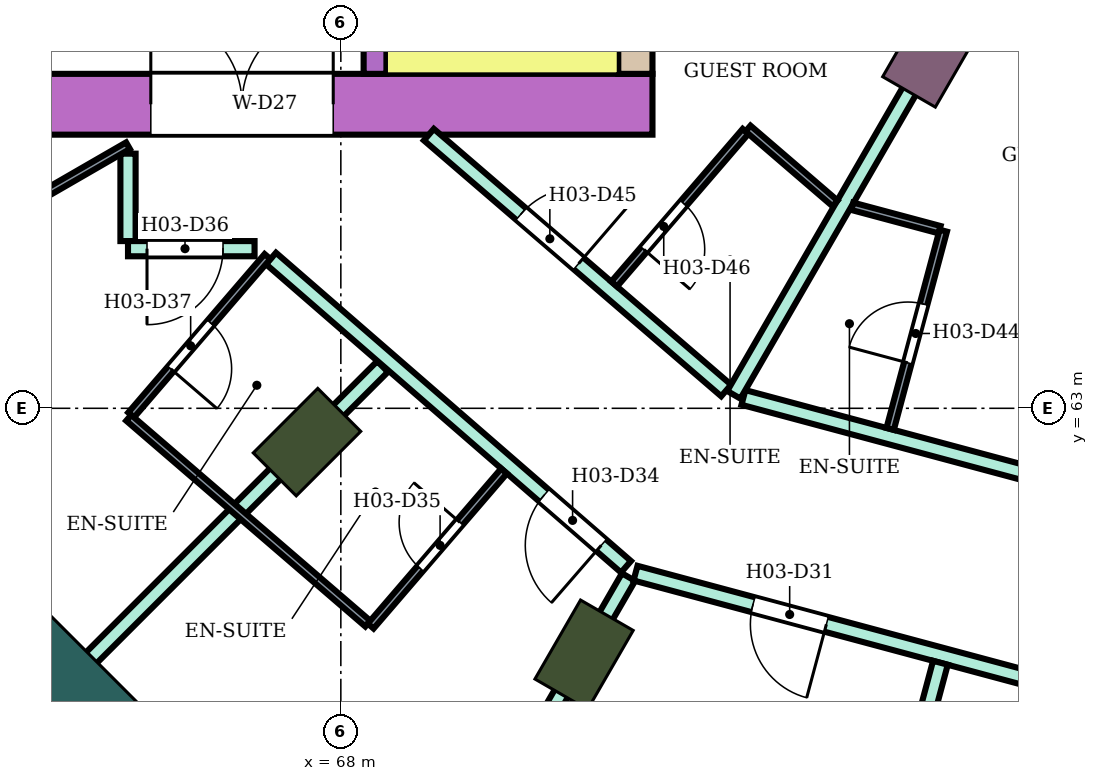
"""IFC4 building model, lengths in metres.
Left out: names, types, materials, properties, quantities, classifications, styles, units other than length and angle.
Written with IfcOpenShell. Run it as: python <this file> out.ifc"""

import sys

from ifc_helpers import new_model, si_unit, direction, frame, frame_2d, origin, origin_2d, place, context, subcontext, project, spatial, rectangle, extrude, element, fill, save


model = new_model("IFC4")
c1 = context("Model", 3, precision=1e-05, world=origin(), true_north=direction((0.0, 1.0)))
c2 = subcontext(c1, "Body", "Model", "MODEL_VIEW")
j1 = project(units=[si_unit("LENGTHUNIT", "METRE"), si_unit("PLANEANGLEUNIT", "RADIAN")], contexts=[c1])
p1 = place(None, origin())
s1 = spatial("IfcSite", under=j1, at=p1, CompositionType="ELEMENT")
p2 = place(p1, origin())
s2 = spatial("IfcBuilding", under=s1, at=p2, CompositionType="ELEMENT")
p3 = place(p2, frame((0.0, 0.0, 55.4)))
s3 = spatial("IfcBuildingStorey", under=s2, at=p3, CompositionType="ELEMENT", Elevation=55.4)
for number, where, z_axis, x_axis in (
    (1, (67.555, 62.555, 0.0), (0.0, 0.0, 1.0), (-0.707, -0.707, 0.0)),
    (2, (71.2, 59.758, 0.0), (0.0, 0.0, 1.0), (-0.5, -0.866, 0.0)),
):
    element("IfcColumn", number, at=place(p3, frame(where, z_axis=z_axis, x_axis=x_axis)), inside=s3, PredefinedType="COLUMN", context=c2, shape_type="SweptSolid", body=[
        extrude(rectangle(XDim=1.2, YDim=0.8, at=origin_2d()), origin(), (0.0, 0.0, 1.0), 3.8),
    ])
p4 = place(p3, frame((75.7, 67.552, 0.0), z_axis=(0.0, 0.0, 1.0), x_axis=(-0.5, -0.866025403784, 0.0)))
e3 = element("IfcColumn", 3, at=p4, inside=s3, PredefinedType="COLUMN", context=c2, shape_type="SweptSolid", body=[
    extrude(rectangle(XDim=0.9, YDim=0.8, at=origin_2d()), origin(), (0.0, 0.0, 1.0), 3.8),
])
p5 = place(p3, frame((64.09, 59.09, 0.0), z_axis=(0.0, 0.0, 1.0), x_axis=(-0.707106781187, -0.707106781187, 0.0)))
e4 = element("IfcColumn", 4, at=p5, inside=s3, PredefinedType="COLUMN", context=c2, shape_type="SweptSolid", body=[
    extrude(rectangle(XDim=1.8, YDim=2.4, at=origin_2d()), origin(), (0.0, 0.0, 1.0), 3.8),
])
p6 = place(p3, frame((72.1, 67.0, 0.0), z_axis=(0.0, 0.0, 1.0), x_axis=(-1.0, 0.0, 0.0)))
e5 = element("IfcWall", 5, at=p6, inside=s3, PredefinedType="SHEAR", context=c2, shape_type="SweptSolid", body=[
    extrude(rectangle(XDim=14.7, YDim=0.8, at=frame_2d((7.35, 0.0))), origin(), (0.0, 0.0, 1.0), 3.48),
])
p7 = place(p6, frame((4.2, 0.0, 0.0)))
e6 = element("IfcOpeningElement", 6, at=p7, cuts=e5, PredefinedType="OPENING", context=c2, shape_type="SweptSolid", body=[
    extrude(rectangle(XDim=2.4, YDim=2.4, at=frame_2d((1.2, 1.2))), frame((0.0, 0.41, 0.0), z_axis=(0.0, -1.0, 0.0), x_axis=(1.0, 0.0, 0.0)), (0.0, 0.0, 1.0), 0.82),
])
p8 = place(p3, frame((71.875, 75.0, 0.0), z_axis=(0.0, 0.0, 1.0), x_axis=(0.0, -1.0, 0.0)))
e7 = element("IfcWall", 7, at=p8, inside=s3, PredefinedType="SHEAR", context=c2, shape_type="SweptSolid", body=[
    extrude(rectangle(XDim=7.6, YDim=0.45, at=frame_2d((3.8, 0.0))), origin(), (0.0, 0.0, 1.0), 3.48),
])
p9 = place(p3, frame((68.45, 75.0, 0.0), z_axis=(0.0, 0.0, 1.0), x_axis=(0.0, -1.0, 0.0)))
e8 = element("IfcWall", 8, at=p9, inside=s3, PredefinedType="SHEAR", context=c2, shape_type="SweptSolid", body=[
    extrude(rectangle(XDim=7.6, YDim=0.3, at=frame_2d((3.8, 0.0))), origin(), (0.0, 0.0, 1.0), 3.48),
])
p10 = place(p9, frame((1.85, 0.0, 0.0)))
e9 = element("IfcOpeningElement", 9, at=p10, cuts=e8, PredefinedType="OPENING", context=c2, shape_type="SweptSolid", body=[
    extrude(rectangle(XDim=0.9, YDim=2.1, at=frame_2d((0.45, 1.05))), frame((0.0, 0.16, 0.0), z_axis=(0.0, -1.0, 0.0), x_axis=(1.0, 0.0, 0.0)), (0.0, 0.0, 1.0), 0.32),
])
p11 = place(p3, frame((76.198, 68.415, 0.0), z_axis=(0.0, 0.0, 1.0), x_axis=(0.965933654434, -0.258789828301, 0.0)))
e10 = element("IfcWall", 10, at=p11, inside=s3, PredefinedType="NOTDEFINED", context=c2, shape_type="SweptSolid", body=[
    extrude(rectangle(XDim=3.936, YDim=0.2, at=frame_2d((1.968, 0.0))), origin(), (0.0, 0.0, 1.0), 3.8),
])
p12 = place(p11, frame((0.468, 0.0, 0.9)))
e11 = element("IfcOpeningElement", 11, at=p12, cuts=e10, PredefinedType="OPENING", context=c2, shape_type="SweptSolid", body=[
    extrude(rectangle(XDim=3.0, YDim=2.3, at=frame_2d((1.5, 1.15))), frame((0.0, 0.11, 0.0), z_axis=(0.0, -1.0, 0.0), x_axis=(1.0, 0.0, 0.0)), (0.0, 0.0, 1.0), 0.22),
])
p13 = place(p3, frame((63.596, 58.596, 0.0), z_axis=(0.0, 0.0, 1.0), x_axis=(0.707106781187, 0.707106781187, 0.0)))
e12 = element("IfcWall", 12, at=p13, inside=s3, PredefinedType="PARTITIONING", context=c2, shape_type="SweptSolid", body=[
    extrude(rectangle(XDim=7.005, YDim=0.2, at=frame_2d((3.503, 0.0))), origin(), (0.0, 0.0, 1.0), 3.35),
])
p14 = place(p3, frame((65.2, 65.2, 0.0), z_axis=(0.0, 0.0, 1.0), x_axis=(0.0, 1.0, 0.0)))
e13 = element("IfcWall", 13, at=p14, inside=s3, PredefinedType="PARTITIONING", context=c2, shape_type="SweptSolid", body=[
    extrude(rectangle(XDim=1.15, YDim=0.2, at=frame_2d((0.575, 0.0))), origin(), (0.0, 0.0, 1.0), 3.35),
])
p15 = place(p3, frame((65.2, 65.1, 0.0), z_axis=(0.0, 0.0, 1.0), x_axis=(1.0, 0.0, 0.0)))
e14 = element("IfcWall", 14, at=p15, inside=s3, PredefinedType="PARTITIONING", context=c2, shape_type="SweptSolid", body=[
    extrude(rectangle(XDim=1.665, YDim=0.2, at=frame_2d((0.833, 0.0))), origin(), (0.0, 0.0, 1.0), 3.35),
])
p16 = place(p15, frame((0.25, 0.0, 0.0)))
e15 = element("IfcOpeningElement", 15, at=p16, cuts=e14, PredefinedType="OPENING", context=c2, shape_type="SweptSolid", body=[
    extrude(rectangle(XDim=1.0, YDim=2.1, at=frame_2d((0.5, 1.05))), frame((0.0, 0.11, 0.0), z_axis=(0.0, -1.0, 0.0), x_axis=(1.0, 0.0, 0.0)), (0.0, 0.0, 1.0), 0.22),
])
p17 = place(p3, frame((67.081, 64.971, 0.0), z_axis=(0.0, 0.0, 1.0), x_axis=(0.755031061605, -0.65568902386, 0.0)))
e16 = element("IfcWall", 16, at=p17, inside=s3, PredefinedType="PARTITIONING", context=c2, shape_type="SweptSolid", body=[
    extrude(rectangle(XDim=6.186, YDim=0.2, at=frame_2d((3.093, 0.0))), origin(), (0.0, 0.0, 1.0), 3.35),
])
p18 = place(p17, frame((4.755, 0.0, 0.0)))
e17 = element("IfcOpeningElement", 17, at=p18, cuts=e16, PredefinedType="OPENING", context=c2, shape_type="SweptSolid", body=[
    extrude(rectangle(XDim=1.0, YDim=2.1, at=frame_2d((0.5, 1.05))), frame((0.0, 0.11, 0.0), z_axis=(0.0, -1.0, 0.0), x_axis=(1.0, 0.0, 0.0)), (0.0, 0.0, 1.0), 0.22),
])
p19 = place(p3, frame((67.095, 52.662, 0.0), z_axis=(0.0, 0.0, 1.0), x_axis=(0.500247659952, 0.865882370021, 0.0)))
e18 = element("IfcWall", 18, at=p19, inside=s3, PredefinedType="PARTITIONING", context=c2, shape_type="SweptSolid", body=[
    extrude(rectangle(XDim=9.375, YDim=0.2, at=frame_2d((4.688, 0.0))), origin(), (0.0, 0.0, 1.0), 3.35),
])
p20 = place(p3, frame((69.158, 66.6, 0.0), z_axis=(0.0, 0.0, 1.0), x_axis=(0.757976058094, -0.652282373943, 0.0)))
e19 = element("IfcWall", 19, at=p20, inside=s3, PredefinedType="PARTITIONING", context=c2, shape_type="SweptSolid", body=[
    extrude(rectangle(XDim=5.16, YDim=0.2, at=frame_2d((2.58, 0.0))), origin(), (0.0, 0.0, 1.0), 3.35),
])
p21 = place(p20, frame((1.6, 0.0, 0.0)))
e20 = element("IfcOpeningElement", 20, at=p21, cuts=e19, PredefinedType="OPENING", context=c2, shape_type="SweptSolid", body=[
    extrude(rectangle(XDim=1.0, YDim=2.1, at=frame_2d((0.5, 1.05))), frame((0.0, 0.11, 0.0), z_axis=(0.0, -1.0, 0.0), x_axis=(1.0, 0.0, 0.0)), (0.0, 0.0, 1.0), 0.22),
])
p22 = place(p3, frame((71.877, 60.831, 0.0), z_axis=(0.0, 0.0, 1.0), x_axis=(0.965852509869, -0.259092510851, 0.0)))
e21 = element("IfcWall", 21, at=p22, inside=s3, PredefinedType="PARTITIONING", context=c2, shape_type="SweptSolid", body=[
    extrude(rectangle(XDim=8.32, YDim=0.2, at=frame_2d((4.16, 0.0))), origin(), (0.0, 0.0, 1.0), 3.35),
])
p23 = place(p22, frame((6.86, 0.0, 0.0)))
e22 = element("IfcOpeningElement", 22, at=p23, cuts=e21, PredefinedType="OPENING", context=c2, shape_type="SweptSolid", body=[
    extrude(rectangle(XDim=1.0, YDim=2.1, at=frame_2d((0.5, 1.05))), frame((0.0, 0.11, 0.0), z_axis=(0.0, -1.0, 0.0), x_axis=(1.0, 0.0, 0.0)), (0.0, 0.0, 1.0), 0.22),
])
p24 = place(p22, frame((1.6, 0.0, 0.0)))
e23 = element("IfcOpeningElement", 23, at=p24, cuts=e21, PredefinedType="OPENING", context=c2, shape_type="SweptSolid", body=[
    extrude(rectangle(XDim=1.0, YDim=2.1, at=frame_2d((0.5, 1.05))), frame((0.0, 0.11, 0.0), z_axis=(0.0, -1.0, 0.0), x_axis=(1.0, 0.0, 0.0)), (0.0, 0.0, 1.0), 0.22),
])
p25 = place(p3, frame((73.297, 63.143, 0.0), z_axis=(0.0, 0.0, 1.0), x_axis=(0.965859030528, -0.25906820173, 0.0)))
e24 = element("IfcWall", 24, at=p25, inside=s3, PredefinedType="PARTITIONING", context=c2, shape_type="SweptSolid", body=[
    extrude(rectangle(XDim=6.81, YDim=0.2, at=frame_2d((3.405, 0.0))), origin(), (0.0, 0.0, 1.0), 3.35),
])
p26 = place(p25, frame((5.39, 0.0, 0.0)))
e25 = element("IfcOpeningElement", 25, at=p26, cuts=e24, PredefinedType="OPENING", context=c2, shape_type="SweptSolid", body=[
    extrude(rectangle(XDim=1.0, YDim=2.1, at=frame_2d((0.5, 1.05))), frame((0.0, 0.11, 0.0), z_axis=(0.0, -1.0, 0.0), x_axis=(1.0, 0.0, 0.0)), (0.0, 0.0, 1.0), 0.22),
])
p27 = place(p3, frame((73.17, 63.177, 0.0), z_axis=(0.0, 0.0, 1.0), x_axis=(0.500239348149, 0.865887171959, 0.0)))
e26 = element("IfcWall", 26, at=p27, inside=s3, PredefinedType="PARTITIONING", context=c2, shape_type="SweptSolid", body=[
    extrude(rectangle(XDim=5.955, YDim=0.2, at=frame_2d((2.978, 0.0))), origin(), (0.0, 0.0, 1.0), 3.35),
])
p28 = place(p3, frame((73.322, 50.081, 0.0), z_axis=(0.0, 0.0, 1.0), x_axis=(0.25896431718, 0.965886889044, 0.0)))
e27 = element("IfcWall", 27, at=p28, inside=s3, PredefinedType="PARTITIONING", context=c2, shape_type="SweptSolid", body=[
    extrude(rectangle(XDim=9.909, YDim=0.2, at=frame_2d((4.955, 0.0))), origin(), (0.0, 0.0, 1.0), 3.35),
])
p29 = place(p3, frame((57.659, 62.101, 0.0), z_axis=(0.0, 0.0, 1.0), x_axis=(0.86602264145, 0.500004784474, 0.0)))
e28 = element("IfcWall", 28, at=p29, inside=s3, PredefinedType="PARTITIONING", context=c2, shape_type="SweptSolid", body=[
    extrude(rectangle(XDim=8.708, YDim=0.1, at=frame_2d((4.354, 0.0))), origin(), (0.0, 0.0, 1.0), 3.35),
])
p30 = place(p29, frame((3.929, 0.0, 0.0)))
e29 = element("IfcOpeningElement", 29, at=p30, cuts=e28, PredefinedType="OPENING", context=c2, shape_type="SweptSolid", body=[
    extrude(rectangle(XDim=0.9, YDim=2.1, at=frame_2d((0.45, 1.05))), frame((0.0, 0.06, 0.0), z_axis=(0.0, -1.0, 0.0), x_axis=(1.0, 0.0, 0.0)), (0.0, 0.0, 1.0), 0.12),
])
p31 = place(p3, frame((65.242, 62.912, 0.0), z_axis=(0.0, 0.0, 1.0), x_axis=(0.652069888227, 0.758158862553, 0.0)))
e30 = element("IfcWall", 30, at=p31, inside=s3, PredefinedType="PARTITIONING", context=c2, shape_type="SweptSolid", body=[
    extrude(rectangle(XDim=2.75, YDim=0.1, at=frame_2d((1.375, 0.0))), origin(), (0.0, 0.0, 1.0), 3.35),
])
p32 = place(p31, frame((0.8, 0.0, 0.0)))
e31 = element("IfcOpeningElement", 31, at=p32, cuts=e30, PredefinedType="OPENING", context=c2, shape_type="SweptSolid", body=[
    extrude(rectangle(XDim=0.8, YDim=2.1, at=frame_2d((0.4, 1.05))), frame((0.0, 0.06, 0.0), z_axis=(0.0, -1.0, 0.0), x_axis=(1.0, 0.0, 0.0)), (0.0, 0.0, 1.0), 0.12),
])
p33 = place(p3, frame((65.209, 62.875, 0.0), z_axis=(0.0, 0.0, 1.0), x_axis=(0.757930378138, -0.652335451969, 0.0)))
e32 = element("IfcWall", 32, at=p33, inside=s3, PredefinedType="PARTITIONING", context=c2, shape_type="SweptSolid", body=[
    extrude(rectangle(XDim=4.15, YDim=0.1, at=frame_2d((2.075, 0.0))), origin(), (0.0, 0.0, 1.0), 3.35),
])
p34 = place(p3, frame((68.393, 60.135, 0.0), z_axis=(0.0, 0.0, 1.0), x_axis=(0.652061182569, 0.758166349944, 0.0)))
e33 = element("IfcWall", 33, at=p34, inside=s3, PredefinedType="PARTITIONING", context=c2, shape_type="SweptSolid", body=[
    extrude(rectangle(XDim=2.69, YDim=0.1, at=frame_2d((1.345, 0.0))), origin(), (0.0, 0.0, 1.0), 3.35),
])
p35 = place(p34, frame((1.0, 0.0, 0.0)))
e34 = element("IfcOpeningElement", 34, at=p35, cuts=e33, PredefinedType="OPENING", context=c2, shape_type="SweptSolid", body=[
    extrude(rectangle(XDim=0.8, YDim=2.1, at=frame_2d((0.4, 1.05))), frame((0.0, 0.06, 0.0), z_axis=(0.0, -1.0, 0.0), x_axis=(1.0, 0.0, 0.0)), (0.0, 0.0, 1.0), 0.12),
])
p36 = place(p3, frame((71.596, 64.635, 0.0), z_axis=(0.0, 0.0, 1.0), x_axis=(0.652285007511, 0.757973791748, 0.0)))
e35 = element("IfcWall", 35, at=p36, inside=s3, PredefinedType="PARTITIONING", context=c2, shape_type="SweptSolid", body=[
    extrude(rectangle(XDim=2.65, YDim=0.1, at=frame_2d((1.325, 0.0))), origin(), (0.0, 0.0, 1.0), 3.35),
])
p37 = place(p36, frame((0.6, 0.0, 0.0)))
e36 = element("IfcOpeningElement", 36, at=p37, cuts=e35, PredefinedType="OPENING", context=c2, shape_type="SweptSolid", body=[
    extrude(rectangle(XDim=0.8, YDim=2.1, at=frame_2d((0.4, 1.05))), frame((0.0, 0.06, 0.0), z_axis=(0.0, -1.0, 0.0), x_axis=(1.0, 0.0, 0.0)), (0.0, 0.0, 1.0), 0.12),
])
p38 = place(p3, frame((73.357, 66.681, 0.0), z_axis=(0.0, 0.0, 1.0), x_axis=(0.758263469747, -0.651948242154, 0.0)))
e37 = element("IfcWall", 37, at=p38, inside=s3, PredefinedType="PARTITIONING", context=c2, shape_type="SweptSolid", body=[
    extrude(rectangle(XDim=1.511, YDim=0.1, at=frame_2d((0.755, 0.0))), origin(), (0.0, 0.0, 1.0), 3.35),
])
p39 = place(p3, frame((74.729, 65.657, 0.0), z_axis=(0.0, 0.0, 1.0), x_axis=(0.965948051503, -0.258736085224, 0.0)))
e38 = element("IfcWall", 38, at=p39, inside=s3, PredefinedType="PARTITIONING", context=c2, shape_type="SweptSolid", body=[
    extrude(rectangle(XDim=1.189, YDim=0.1, at=frame_2d((0.594, 0.0))), origin(), (0.0, 0.0, 1.0), 3.35),
])
p40 = place(p3, frame((75.227, 62.729, 0.0), z_axis=(0.0, 0.0, 1.0), x_axis=(0.258945475746, 0.965891940432, 0.0)))
e39 = element("IfcWall", 39, at=p40, inside=s3, PredefinedType="PARTITIONING", context=c2, shape_type="SweptSolid", body=[
    extrude(rectangle(XDim=2.7, YDim=0.1, at=frame_2d((1.35, 0.0))), origin(), (0.0, 0.0, 1.0), 3.35),
])
p41 = place(p40, frame((0.9, 0.0, 0.0)))
e40 = element("IfcOpeningElement", 40, at=p41, cuts=e39, PredefinedType="OPENING", context=c2, shape_type="SweptSolid", body=[
    extrude(rectangle(XDim=0.8, YDim=2.1, at=frame_2d((0.4, 1.05))), frame((0.0, 0.06, 0.0), z_axis=(0.0, -1.0, 0.0), x_axis=(1.0, 0.0, 0.0)), (0.0, 0.0, 1.0), 0.12),
])
p42 = place(p12, origin())
e41 = element("IfcWindow", 41, at=p42, inside=s3, PartitioningType="SINGLE_PANEL", PredefinedType="WINDOW", context=c2, shape_type="SweptSolid", body=[
    extrude(rectangle(XDim=3.0, YDim=2.3, at=frame_2d((1.5, 1.15))), frame((0.0, 0.03, 0.0), z_axis=(0.0, -1.0, 0.0), x_axis=(1.0, 0.0, 0.0)), (0.0, 0.0, 1.0), 0.06),
])
fill(e11, e41)
p43 = place(p24, frame((1.0, 0.0, 0.0), z_axis=(0.0, 0.0, 1.0), x_axis=(-1.0, 0.0, 0.0)))
e42 = element("IfcDoor", 42, at=p43, inside=s3, OperationType="SINGLE_SWING_LEFT", PredefinedType="DOOR", context=c2, shape_type="SweptSolid", body=[
    extrude(rectangle(XDim=1.0, YDim=2.1, at=frame_2d((0.5, 1.05))), frame((0.0, 0.025, 0.0), z_axis=(0.0, -1.0, 0.0), x_axis=(1.0, 0.0, 0.0)), (0.0, 0.0, 1.0), 0.05),
])
fill(e23, e42)
p44 = place(p18, frame((1.0, 0.0, 0.0), z_axis=(0.0, 0.0, 1.0), x_axis=(-1.0, 0.0, 0.0)))
e43 = element("IfcDoor", 43, at=p44, inside=s3, OperationType="SINGLE_SWING_LEFT", PredefinedType="DOOR", context=c2, shape_type="SweptSolid", body=[
    extrude(rectangle(XDim=1.0, YDim=2.1, at=frame_2d((0.5, 1.05))), frame((0.0, 0.025, 0.0), z_axis=(0.0, -1.0, 0.0), x_axis=(1.0, 0.0, 0.0)), (0.0, 0.0, 1.0), 0.05),
])
fill(e17, e43)
p45 = place(p35, origin())
e44 = element("IfcDoor", 44, at=p45, inside=s3, OperationType="SINGLE_SWING_RIGHT", PredefinedType="DOOR", context=c2, shape_type="SweptSolid", body=[
    extrude(rectangle(XDim=0.8, YDim=2.1, at=frame_2d((0.4, 1.05))), frame((0.0, 0.025, 0.0), z_axis=(0.0, -1.0, 0.0), x_axis=(1.0, 0.0, 0.0)), (0.0, 0.0, 1.0), 0.05),
])
fill(e34, e44)
p46 = place(p16, frame((1.0, 0.0, 0.0), z_axis=(0.0, 0.0, 1.0), x_axis=(-1.0, 0.0, 0.0)))
e45 = element("IfcDoor", 45, at=p46, inside=s3, OperationType="SINGLE_SWING_RIGHT", PredefinedType="DOOR", context=c2, shape_type="SweptSolid", body=[
    extrude(rectangle(XDim=1.0, YDim=2.1, at=frame_2d((0.5, 1.05))), frame((0.0, 0.025, 0.0), z_axis=(0.0, -1.0, 0.0), x_axis=(1.0, 0.0, 0.0)), (0.0, 0.0, 1.0), 0.05),
])
fill(e15, e45)
p47 = place(p32, frame((0.8, 0.0, 0.0), z_axis=(0.0, 0.0, 1.0), x_axis=(-1.0, 0.0, 0.0)))
e46 = element("IfcDoor", 46, at=p47, inside=s3, OperationType="SINGLE_SWING_RIGHT", PredefinedType="DOOR", context=c2, shape_type="SweptSolid", body=[
    extrude(rectangle(XDim=0.8, YDim=2.1, at=frame_2d((0.4, 1.05))), frame((0.0, 0.025, 0.0), z_axis=(0.0, -1.0, 0.0), x_axis=(1.0, 0.0, 0.0)), (0.0, 0.0, 1.0), 0.05),
])
fill(e31, e46)
p48 = place(p41, origin())
e47 = element("IfcDoor", 47, at=p48, inside=s3, OperationType="SINGLE_SWING_LEFT", PredefinedType="DOOR", context=c2, shape_type="SweptSolid", body=[
    extrude(rectangle(XDim=0.8, YDim=2.1, at=frame_2d((0.4, 1.05))), frame((0.0, 0.025, 0.0), z_axis=(0.0, -1.0, 0.0), x_axis=(1.0, 0.0, 0.0)), (0.0, 0.0, 1.0), 0.05),
])
fill(e40, e47)
p49 = place(p21, origin())
e48 = element("IfcDoor", 48, at=p49, inside=s3, OperationType="SINGLE_SWING_RIGHT", PredefinedType="DOOR", context=c2, shape_type="SweptSolid", body=[
    extrude(rectangle(XDim=1.0, YDim=2.1, at=frame_2d((0.5, 1.05))), frame((0.0, 0.025, 0.0), z_axis=(0.0, -1.0, 0.0), x_axis=(1.0, 0.0, 0.0)), (0.0, 0.0, 1.0), 0.05),
])
fill(e20, e48)
p50 = place(p37, frame((0.8, 0.0, 0.0), z_axis=(0.0, 0.0, 1.0), x_axis=(-1.0, 0.0, 0.0)))
e49 = element("IfcDoor", 49, at=p50, inside=s3, OperationType="SINGLE_SWING_RIGHT", PredefinedType="DOOR", context=c2, shape_type="SweptSolid", body=[
    extrude(rectangle(XDim=0.8, YDim=2.1, at=frame_2d((0.4, 1.05))), frame((0.0, 0.025, 0.0), z_axis=(0.0, -1.0, 0.0), x_axis=(1.0, 0.0, 0.0)), (0.0, 0.0, 1.0), 0.05),
])
fill(e36, e49)
p51 = place(p7, frame((2.4, 0.0, 0.0), z_axis=(0.0, 0.0, 1.0), x_axis=(-1.0, 0.0, 0.0)))
e50 = element("IfcDoor", 50, at=p51, inside=s3, OperationType="DOUBLE_DOOR_SINGLE_SWING", PredefinedType="DOOR", context=c2, shape_type="SweptSolid", body=[
    extrude(rectangle(XDim=2.4, YDim=2.4, at=frame_2d((1.2, 1.2))), frame((0.0, 0.025, 0.0), z_axis=(0.0, -1.0, 0.0), x_axis=(1.0, 0.0, 0.0)), (0.0, 0.0, 1.0), 0.05),
])
fill(e6, e50)
save(model, sys.argv[1])
